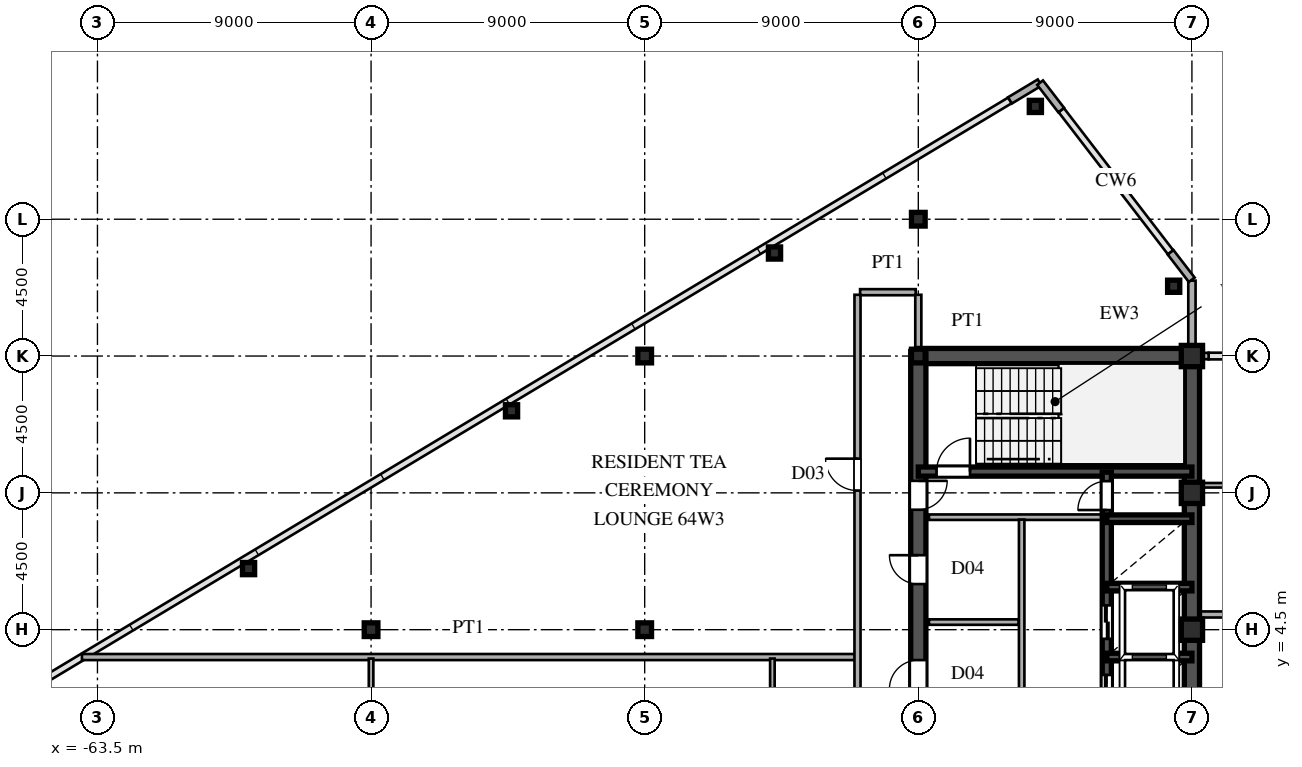
"""IFC4 building model, lengths in metres.
Left out: names, types, materials, properties, quantities, classifications, styles, units other than length and angle.
Written with IfcOpenShell. Run it as: python <this file> out.ifc"""

import sys

from ifc_helpers import new_model, si_unit, direction, frame, frame_2d, origin, origin_2d, place, context, subcontext, project, spatial, rectangle, hollow_rectangle, i_section, extrude, source, transform, mapped, element, fill, save


model = new_model("IFC4")
c1 = context("Model", 3, precision=1e-05, world=origin(), true_north=direction((0.0, 1.0)))
c2 = subcontext(c1, "Body", "Model", "MODEL_VIEW")
j1 = project(units=[si_unit("LENGTHUNIT", "METRE"), si_unit("PLANEANGLEUNIT", "RADIAN")], contexts=[c1])
p1 = place(None, origin())
s1 = spatial("IfcSite", under=j1, at=p1, CompositionType="ELEMENT")
p2 = place(p1, origin())
s2 = spatial("IfcBuilding", under=s1, at=p2, CompositionType="ELEMENT")
p3 = place(p2, frame((0.0, 0.0, 243.15)))
s3 = spatial("IfcBuildingStorey", under=s2, at=p3, CompositionType="ELEMENT", Elevation=243.15)
m1 = source(origin(), c2, "Body", "SweptSolid", [
    extrude(hollow_rectangle(XDim=0.7, YDim=0.7, WallThickness=0.03, at=origin_2d()), origin(), (0.0, 0.0, 1.0), 3.75),
])
for number, where, z_axis, x_axis in (
    (1, (-27.5, 4.5, 0.0), (0.0, 0.0, 1.0), (1.0, 0.0, 0.0)),
    (2, (-27.5, 9.0, 0.0), (0.0, 0.0, 1.0), (1.0, 0.0, 0.0)),
    (3, (-27.5, 13.5, 0.0), (0.0, 0.0, 1.0), (1.0, 0.0, 0.0)),
):
    element("IfcColumn", number, at=place(p3, frame(where, z_axis=z_axis, x_axis=x_axis)), inside=s3, PredefinedType="COLUMN", context=c2, shape_type="MappedRepresentation", body=[
        mapped(m1, transform((0.0, 0.0, 0.0), scale=1.0)),
    ])
m2 = source(origin(), c2, "Body", "SweptSolid", [
    extrude(i_section(OverallWidth=0.45, OverallDepth=0.45, WebThickness=0.016, FlangeThickness=0.025, at=origin_2d()), origin(), (0.0, 0.0, 1.0), 3.75),
])
for number, where, z_axis, x_axis in (
    (4, (-36.5, 13.5, 0.0), (0.0, 0.0, 1.0), (1.0, 0.0, 0.0)),
    (5, (-36.5, 18.0, 0.0), (0.0, 0.0, 1.0), (1.0, 0.0, 0.0)),
    (6, (-45.5, 4.5, 0.0), (0.0, 0.0, 1.0), (1.0, 0.0, 0.0)),
    (7, (-45.5, 13.5, 0.0), (0.0, 0.0, 1.0), (1.0, 0.0, 0.0)),
    (8, (-54.5, 4.5, 0.0), (0.0, 0.0, 1.0), (1.0, 0.0, 0.0)),
):
    element("IfcColumn", number, at=place(p3, frame(where, z_axis=z_axis, x_axis=x_axis)), inside=s3, PredefinedType="COLUMN", context=c2, shape_type="MappedRepresentation", body=[
        mapped(m2, transform((0.0, 0.0, 0.0), scale=1.0)),
    ])
m3 = source(origin(), c2, "Body", "SweptSolid", [
    extrude(hollow_rectangle(XDim=0.4, YDim=0.4, WallThickness=0.016, at=origin_2d()), origin(), (0.0, 0.0, 1.0), 3.75),
])
for number, where, z_axis, x_axis in (
    (9, (-28.1, 15.796, 0.0), (0.0, 0.0, 1.0), (1.0, 0.0, 0.0)),
    (10, (-32.65, 21.71, 0.0), (0.0, 0.0, 1.0), (1.0, 0.0, 0.0)),
    (11, (-41.23, 16.889, 0.0), (0.0, 0.0, 1.0), (1.0, 0.0, 0.0)),
    (12, (-49.88, 11.699, 0.0), (0.0, 0.0, 1.0), (1.0, 0.0, 0.0)),
    (13, (-58.53, 6.509, 0.0), (0.0, 0.0, 1.0), (1.0, 0.0, 0.0)),
):
    element("IfcColumn", number, at=place(p3, frame(where, z_axis=z_axis, x_axis=x_axis)), inside=s3, PredefinedType="COLUMN", context=c2, shape_type="MappedRepresentation", body=[
        mapped(m3, transform((0.0, 0.0, 0.0), scale=1.0)),
    ])
p4 = place(p3, frame((-27.5, 13.755, 0.0), z_axis=(0.0, 0.0, 1.0), x_axis=(0.0, 1.0, 0.0)))
e14 = element("IfcWall", 14, at=p4, inside=s3, PredefinedType="SOLIDWALL", context=c2, shape_type="SweptSolid", body=[
    extrude(rectangle(XDim=0.62, YDim=0.24, at=frame_2d((0.31, 0.0))), origin(), (0.0, 0.0, 1.0), 3.03),
])
p5 = place(p3, frame((-27.5, 14.375, 0.0), z_axis=(0.0, 0.0, 1.0), x_axis=(0.0, 1.0, 0.0)))
e15 = element("IfcWall", 15, at=p5, inside=s3, PredefinedType="SOLIDWALL", context=c2, shape_type="SweptSolid", body=[
    extrude(rectangle(XDim=1.605, YDim=0.24, at=frame_2d((0.803, 0.0))), origin(), (0.0, 0.0, 1.0), 3.53),
])
for number, where, z_axis, x_axis in (
    (16, (-27.506, 16.008, 0.0), (0.0, 0.0, 1.0), (-0.61, 0.793, 0.0)),
    (17, (-31.799, 21.588, 0.0), (0.0, 0.0, 1.0), (-0.61, 0.793, 0.0)),
    (18, (-32.509, 22.495, 0.0), (0.0, 0.0, 1.0), (-0.857, -0.515, 0.0)),
):
    element("IfcWall", number, at=place(p3, frame(where, z_axis=z_axis, x_axis=x_axis)), inside=s3, PredefinedType="SOLIDWALL", context=c2, shape_type="SweptSolid", body=[
        extrude(rectangle(XDim=1.14, YDim=0.24, at=frame_2d((0.57, 0.0))), origin(), (0.0, 0.0, 1.0), 3.53),
    ])
p6 = place(p3, frame((-27.49, 13.5, 0.0), z_axis=(0.0, 0.0, 1.0), x_axis=(1.0, 0.0, 0.0)))
e19 = element("IfcWall", 19, at=p6, inside=s3, PredefinedType="SOLIDWALL", context=c2, shape_type="SweptSolid", body=[
    extrude(rectangle(XDim=0.54, YDim=0.21, at=frame_2d((0.27, 0.0))), origin(), (0.0, 0.0, 1.0), 3.03),
])
p7 = place(p3, frame((-27.5, 1.3, 0.0), z_axis=(0.0, 0.0, 1.0), x_axis=(0.0, 1.0, 0.0)))
e20 = element("IfcWall", 20, at=p7, inside=s3, PredefinedType="SHEAR", context=c2, shape_type="SweptSolid", body=[
    extrude(rectangle(XDim=12.2, YDim=0.5, at=frame_2d((6.1, 0.0))), origin(), (0.0, 0.0, 1.0), 3.53),
])
p8 = place(p3, frame((-36.5, 13.5, 0.0), z_axis=(0.0, 0.0, 1.0), x_axis=(1.0, 0.0, 0.0)))
e21 = element("IfcWall", 21, at=p8, inside=s3, PredefinedType="SHEAR", context=c2, shape_type="SweptSolid", body=[
    extrude(rectangle(XDim=9.0, YDim=0.5, at=frame_2d((4.5, 0.0))), origin(), (0.0, 0.0, 1.0), 3.53),
])
p9 = place(p3, frame((-36.5, 8.2, 0.0), z_axis=(0.0, 0.0, 1.0), x_axis=(0.0, 1.0, 0.0)))
e22 = element("IfcWall", 22, at=p9, inside=s3, PredefinedType="SHEAR", context=c2, shape_type="SweptSolid", body=[
    extrude(rectangle(XDim=5.45, YDim=0.5, at=frame_2d((2.725, 0.0))), origin(), (0.0, 0.0, 1.0), 3.53),
])
p10 = place(p9, frame((0.245, 0.0, 0.0)))
e23 = element("IfcOpeningElement", 23, at=p10, cuts=e22, PredefinedType="OPENING", context=c2, shape_type="SweptSolid", body=[
    extrude(rectangle(XDim=0.95, YDim=2.15, at=frame_2d((0.475, 1.075))), frame((0.0, 0.26, 0.0), z_axis=(0.0, -1.0, 0.0), x_axis=(1.0, 0.0, 0.0)), (0.0, 0.0, 1.0), 0.52),
])
p11 = place(p3, frame((-36.5, 1.3, 0.0), z_axis=(0.0, 0.0, 1.0), x_axis=(0.0, 1.0, 0.0)))
e24 = element("IfcWall", 24, at=p11, inside=s3, PredefinedType="SHEAR", context=c2, shape_type="SweptSolid", body=[
    extrude(rectangle(XDim=3.45, YDim=0.5, at=frame_2d((1.725, 0.0))), origin(), (0.0, 0.0, 1.0), 3.53),
])
p12 = place(p11, frame((1.25, 0.0, 0.0)))
e25 = element("IfcOpeningElement", 25, at=p12, cuts=e24, PredefinedType="OPENING", context=c2, shape_type="SweptSolid", body=[
    extrude(rectangle(XDim=0.95, YDim=2.15, at=frame_2d((0.475, 1.075))), frame((0.0, 0.26, 0.0), z_axis=(0.0, -1.0, 0.0), x_axis=(1.0, 0.0, 0.0)), (0.0, 0.0, 1.0), 0.52),
])
p13 = place(p3, frame((-36.5, 4.75, 0.0), z_axis=(0.0, 0.0, 1.0), x_axis=(0.0, 1.0, 0.0)))
e26 = element("IfcWall", 26, at=p13, inside=s3, PredefinedType="SHEAR", context=c2, shape_type="SweptSolid", body=[
    extrude(rectangle(XDim=3.45, YDim=0.5, at=frame_2d((1.725, 0.0))), origin(), (0.0, 0.0, 1.0), 3.53),
])
p14 = place(p13, frame((1.25, 0.0, 0.0)))
e27 = element("IfcOpeningElement", 27, at=p14, cuts=e26, PredefinedType="OPENING", context=c2, shape_type="SweptSolid", body=[
    extrude(rectangle(XDim=0.95, YDim=2.15, at=frame_2d((0.475, 1.075))), frame((0.0, 0.26, 0.0), z_axis=(0.0, -1.0, 0.0), x_axis=(1.0, 0.0, 0.0)), (0.0, 0.0, 1.0), 0.52),
])
p15 = place(p3, frame((-36.5, 9.7, 0.0), z_axis=(0.0, 0.0, 1.0), x_axis=(1.0, 0.0, 0.0)))
e28 = element("IfcWall", 28, at=p15, inside=s3, PredefinedType="SHEAR", context=c2, shape_type="SweptSolid", body=[
    extrude(rectangle(XDim=9.0, YDim=0.3, at=frame_2d((4.5, 0.0))), origin(), (0.0, 0.0, 1.0), 3.53),
])
p16 = place(p15, frame((0.6, 0.0, 0.0)))
e29 = element("IfcOpeningElement", 29, at=p16, cuts=e28, PredefinedType="OPENING", context=c2, shape_type="SweptSolid", body=[
    extrude(rectangle(XDim=1.1, YDim=2.2, at=frame_2d((0.55, 1.1))), frame((0.0, 0.16, 0.0), z_axis=(0.0, -1.0, 0.0), x_axis=(1.0, 0.0, 0.0)), (0.0, 0.0, 1.0), 0.32),
])
for number, where, z_axis, x_axis in (
    (30, (-30.3, 3.6, 0.0), (0.0, 0.0, 1.0), (1.0, 0.0, 0.0)),
    (31, (-30.3, 5.9, 0.0), (0.0, 0.0, 1.0), (1.0, 0.0, 0.0)),
    (32, (-30.3, 8.15, 0.0), (0.0, 0.0, 1.0), (1.0, 0.0, 0.0)),
):
    element("IfcWall", number, at=place(p3, frame(where, z_axis=z_axis, x_axis=x_axis)), inside=s3, PredefinedType="SHEAR", context=c2, shape_type="SweptSolid", body=[
        extrude(rectangle(XDim=2.8, YDim=0.25, at=frame_2d((1.4, 0.0))), origin(), (0.0, 0.0, 1.0), 3.53),
    ])
p17 = place(p3, frame((-30.3, 1.32, 0.0), z_axis=(0.0, 0.0, 1.0), x_axis=(0.0, 1.0, 0.0)))
e33 = element("IfcWall", 33, at=p17, inside=s3, PredefinedType="SHEAR", context=c2, shape_type="SweptSolid", body=[
    extrude(rectangle(XDim=2.28, YDim=0.3, at=frame_2d((1.14, 0.0))), origin(), (0.0, 0.0, 1.0), 3.53),
])
p18 = place(p17, frame((0.59, 0.0, 0.0)))
e34 = element("IfcOpeningElement", 34, at=p18, cuts=e33, PredefinedType="OPENING", context=c2, shape_type="SweptSolid", body=[
    extrude(rectangle(XDim=1.1, YDim=2.2, at=frame_2d((0.55, 1.1))), frame((0.0, 0.16, 0.0), z_axis=(0.0, -1.0, 0.0), x_axis=(1.0, 0.0, 0.0)), (0.0, 0.0, 1.0), 0.32),
])
p19 = place(p3, frame((-30.3, 3.6, 0.0), z_axis=(0.0, 0.0, 1.0), x_axis=(0.0, 1.0, 0.0)))
e35 = element("IfcWall", 35, at=p19, inside=s3, PredefinedType="SHEAR", context=c2, shape_type="SweptSolid", body=[
    extrude(rectangle(XDim=2.3, YDim=0.3, at=frame_2d((1.15, 0.0))), origin(), (0.0, 0.0, 1.0), 3.53),
])
p20 = place(p19, frame((0.6, 0.0, 0.0)))
e36 = element("IfcOpeningElement", 36, at=p20, cuts=e35, PredefinedType="OPENING", context=c2, shape_type="SweptSolid", body=[
    extrude(rectangle(XDim=1.1, YDim=2.2, at=frame_2d((0.55, 1.1))), frame((0.0, 0.16, 0.0), z_axis=(0.0, -1.0, 0.0), x_axis=(1.0, 0.0, 0.0)), (0.0, 0.0, 1.0), 0.32),
])
p21 = place(p3, frame((-30.3, 5.9, 0.0), z_axis=(0.0, 0.0, 1.0), x_axis=(0.0, 1.0, 0.0)))
e37 = element("IfcWall", 37, at=p21, inside=s3, PredefinedType="SHEAR", context=c2, shape_type="SweptSolid", body=[
    extrude(rectangle(XDim=2.25, YDim=0.3, at=frame_2d((1.125, 0.0))), origin(), (0.0, 0.0, 1.0), 3.53),
])
p22 = place(p3, frame((-30.3, 8.15, 0.0), z_axis=(0.0, 0.0, 1.0), x_axis=(0.0, 1.0, 0.0)))
e38 = element("IfcWall", 38, at=p22, inside=s3, PredefinedType="SHEAR", context=c2, shape_type="SweptSolid", body=[
    extrude(rectangle(XDim=1.53, YDim=0.3, at=frame_2d((0.765, 0.0))), origin(), (0.0, 0.0, 1.0), 3.53),
])
p23 = place(p22, frame((0.285, 0.0, 0.0)))
e39 = element("IfcOpeningElement", 39, at=p23, cuts=e38, PredefinedType="OPENING", context=c2, shape_type="SweptSolid", body=[
    extrude(rectangle(XDim=0.95, YDim=2.15, at=frame_2d((0.475, 1.075))), frame((0.0, 0.16, 0.0), z_axis=(0.0, -1.0, 0.0), x_axis=(1.0, 0.0, 0.0)), (0.0, 0.0, 1.0), 0.32),
])
p24 = place(p3, frame((-36.15, 8.2, 0.0), z_axis=(0.0, 0.0, 1.0), x_axis=(1.0, 0.0, 0.0)))
e40 = element("IfcWall", 40, at=p24, inside=s3, PredefinedType="PARTITIONING", context=c2, shape_type="SweptSolid", body=[
    extrude(rectangle(XDim=5.7, YDim=0.18, at=frame_2d((2.85, 0.0))), origin(), (0.0, 0.0, 1.0), 3.53),
])
p25 = place(p3, frame((-33.1, 1.38, 0.0), z_axis=(0.0, 0.0, 1.0), x_axis=(0.0, 1.0, 0.0)))
e41 = element("IfcWall", 41, at=p25, inside=s3, PredefinedType="PARTITIONING", context=c2, shape_type="SweptSolid", body=[
    extrude(rectangle(XDim=6.74, YDim=0.18, at=frame_2d((3.37, 0.0))), origin(), (0.0, 0.0, 1.0), 3.53),
])
p26 = place(p3, frame((-36.15, 4.75, 0.0), z_axis=(0.0, 0.0, 1.0), x_axis=(1.0, 0.0, 0.0)))
e42 = element("IfcWall", 42, at=p26, inside=s3, PredefinedType="PARTITIONING", context=c2, shape_type="SweptSolid", body=[
    extrude(rectangle(XDim=2.95, YDim=0.18, at=frame_2d((1.475, 0.0))), origin(), (0.0, 0.0, 1.0), 3.53),
])
p27 = place(p3, frame((-64.01, 3.6, 0.0), z_axis=(0.0, 0.0, 1.0), x_axis=(1.0, 0.0, 0.0)))
e43 = element("IfcWall", 43, at=p27, inside=s3, PredefinedType="PARTITIONING", context=c2, shape_type="SweptSolid", body=[
    extrude(rectangle(XDim=25.43, YDim=0.2, at=frame_2d((12.715, 0.0))), origin(), (0.0, 0.0, 1.0), 3.53),
])
p28 = place(p3, frame((-27.245, 5.0, 0.0), z_axis=(0.0, 0.0, 1.0), x_axis=(1.0, 0.0, 0.0)))
e44 = element("IfcWall", 44, at=p28, inside=s3, PredefinedType="PARTITIONING", context=c2, shape_type="SweptSolid", body=[
    extrude(rectangle(XDim=54.49, YDim=0.2, at=frame_2d((27.245, 0.0))), origin(), (0.0, 0.0, 1.0), 3.53),
])
p29 = place(p28, frame((23.47, 0.0, 0.0)))
e45 = element("IfcOpeningElement", 45, at=p29, cuts=e44, PredefinedType="OPENING", context=c2, shape_type="SweptSolid", body=[
    extrude(rectangle(XDim=1.05, YDim=2.25, at=frame_2d((0.525, 1.125))), frame((0.0, 0.11, 0.0), z_axis=(0.0, -1.0, 0.0), x_axis=(1.0, 0.0, 0.0)), (0.0, 0.0, 1.0), 0.22),
])
p30 = place(p3, frame((-27.245, 9.25, 0.0), z_axis=(0.0, 0.0, 1.0), x_axis=(1.0, 0.0, 0.0)))
e46 = element("IfcWall", 46, at=p30, inside=s3, PredefinedType="PARTITIONING", context=c2, shape_type="SweptSolid", body=[
    extrude(rectangle(XDim=6.66, YDim=0.15, at=frame_2d((3.33, 0.0))), origin(), (0.0, 0.0, 1.0), 3.53),
])
p31 = place(p30, frame((3.07, 0.0, 0.0)))
e47 = element("IfcOpeningElement", 47, at=p31, cuts=e46, PredefinedType="OPENING", context=c2, shape_type="SweptSolid", body=[
    extrude(rectangle(XDim=0.95, YDim=2.15, at=frame_2d((0.475, 1.075))), frame((0.0, 0.085, 0.0), z_axis=(0.0, -1.0, 0.0), x_axis=(1.0, 0.0, 0.0)), (0.0, 0.0, 1.0), 0.17),
])
p32 = place(p3, frame((-38.415, 15.6, 0.0), z_axis=(0.0, 0.0, 1.0), x_axis=(1.0, 0.0, 0.0)))
e48 = element("IfcWall", 48, at=p32, inside=s3, PredefinedType="PARTITIONING", context=c2, shape_type="SweptSolid", body=[
    extrude(rectangle(XDim=1.83, YDim=0.2, at=frame_2d((0.915, 0.0))), origin(), (0.0, 0.0, 1.0), 3.53),
])
p33 = place(p3, frame((-54.5, -8.75, 0.0), z_axis=(0.0, 0.0, 1.0), x_axis=(0.0, 1.0, 0.0)))
e49 = element("IfcWall", 49, at=p33, inside=s3, PredefinedType="PARTITIONING", context=c2, shape_type="SweptSolid", body=[
    extrude(rectangle(XDim=12.3, YDim=0.15, at=frame_2d((6.15, 0.0))), origin(), (0.0, 0.0, 1.0), 2.93),
])
p34 = place(p33, frame((5.675, 0.0, 0.0)))
e50 = element("IfcOpeningElement", 50, at=p34, cuts=e49, PredefinedType="OPENING", context=c2, shape_type="SweptSolid", body=[
    extrude(rectangle(XDim=0.95, YDim=2.15, at=frame_2d((0.475, 1.075))), frame((0.0, 0.085, 0.0), z_axis=(0.0, -1.0, 0.0), x_axis=(1.0, 0.0, 0.0)), (0.0, 0.0, 1.0), 0.17),
])
p35 = place(p3, frame((-41.3, -0.068, 0.0), z_axis=(0.0, 0.0, 1.0), x_axis=(0.0, 1.0, 0.0)))
e51 = element("IfcWall", 51, at=p35, inside=s3, PredefinedType="PARTITIONING", context=c2, shape_type="SweptSolid", body=[
    extrude(rectangle(XDim=3.618, YDim=0.15, at=frame_2d((1.809, 0.0))), origin(), (0.0, 0.0, 1.0), 3.53),
])
p36 = place(p3, frame((-38.5, -15.515, 0.0), z_axis=(0.0, 0.0, 1.0), x_axis=(0.0, 1.0, 0.0)))
e52 = element("IfcWall", 52, at=p36, inside=s3, PredefinedType="PARTITIONING", context=c2, shape_type="SweptSolid", body=[
    extrude(rectangle(XDim=31.03, YDim=0.2, at=frame_2d((15.515, 0.0))), origin(), (0.0, 0.0, 1.0), 3.53),
])
p37 = place(p36, frame((2.79, 0.0, 0.0)))
e53 = element("IfcOpeningElement", 53, at=p37, cuts=e52, PredefinedType="OPENING", context=c2, shape_type="SweptSolid", body=[
    extrude(rectangle(XDim=1.05, YDim=2.25, at=frame_2d((0.525, 1.125))), frame((0.0, 0.11, 0.0), z_axis=(0.0, -1.0, 0.0), x_axis=(1.0, 0.0, 0.0)), (0.0, 0.0, 1.0), 0.22),
])
p38 = place(p36, frame((12.204, 0.0, 0.0)))
e54 = element("IfcOpeningElement", 54, at=p38, cuts=e52, PredefinedType="OPENING", context=c2, shape_type="SweptSolid", body=[
    extrude(rectangle(XDim=1.05, YDim=2.25, at=frame_2d((0.525, 1.125))), frame((0.0, 0.11, 0.0), z_axis=(0.0, -1.0, 0.0), x_axis=(1.0, 0.0, 0.0)), (0.0, 0.0, 1.0), 0.22),
])
p39 = place(p36, frame((24.59, 0.0, 0.0)))
e55 = element("IfcOpeningElement", 55, at=p39, cuts=e52, PredefinedType="OPENING", context=c2, shape_type="SweptSolid", body=[
    extrude(rectangle(XDim=1.05, YDim=2.25, at=frame_2d((0.525, 1.125))), frame((0.0, 0.11, 0.0), z_axis=(0.0, -1.0, 0.0), x_axis=(1.0, 0.0, 0.0)), (0.0, 0.0, 1.0), 0.22),
])
p40 = place(p3, frame((-36.5, 13.755, 0.0), z_axis=(0.0, 0.0, 1.0), x_axis=(0.0, 1.0, 0.0)))
e56 = element("IfcWall", 56, at=p40, inside=s3, PredefinedType="PARTITIONING", context=c2, shape_type="SweptSolid", body=[
    extrude(rectangle(XDim=1.76, YDim=0.2, at=frame_2d((0.88, 0.0))), origin(), (0.0, 0.0, 1.0), 2.93),
])
m4 = source(origin(), c2, "Body", "SweptSolid", [
    extrude(rectangle(XDim=0.95, YDim=2.15, at=frame_2d((0.475, 1.075))), frame((0.0, 0.025, 0.0), z_axis=(0.0, -1.0, 0.0), x_axis=(1.0, 0.0, 0.0)), (0.0, 0.0, 1.0), 0.05),
])
p41 = place(p10, frame((0.95, 0.0, 0.0), z_axis=(0.0, 0.0, 1.0), x_axis=(-1.0, 0.0, 0.0)))
e57 = element("IfcDoor", 57, at=p41, inside=s3, OperationType="SINGLE_SWING_RIGHT", PredefinedType="DOOR", context=c2, shape_type="MappedRepresentation", body=[
    mapped(m4, transform((0.0, 0.0, 0.0), scale=1.0)),
])
fill(e23, e57)
p42 = place(p12, origin())
e58 = element("IfcDoor", 58, at=p42, inside=s3, OperationType="SINGLE_SWING_LEFT", PredefinedType="DOOR", context=c2, shape_type="MappedRepresentation", body=[
    mapped(m4, transform((0.0, 0.0, 0.0), scale=1.0)),
])
fill(e25, e58)
p43 = place(p14, origin())
e59 = element("IfcDoor", 59, at=p43, inside=s3, OperationType="SINGLE_SWING_RIGHT", PredefinedType="DOOR", context=c2, shape_type="MappedRepresentation", body=[
    mapped(m4, transform((0.0, 0.0, 0.0), scale=1.0)),
])
fill(e27, e59)
m5 = source(origin(), c2, "Body", "SweptSolid", [
    extrude(rectangle(XDim=1.1, YDim=2.2, at=frame_2d((0.55, 1.1))), frame((0.0, 0.025, 0.0), z_axis=(0.0, -1.0, 0.0), x_axis=(1.0, 0.0, 0.0)), (0.0, 0.0, 1.0), 0.05),
])
p44 = place(p16, origin())
e60 = element("IfcDoor", 60, at=p44, inside=s3, OperationType="SINGLE_SWING_RIGHT", PredefinedType="DOOR", context=c2, shape_type="MappedRepresentation", body=[
    mapped(m5, transform((0.0, 0.0, 0.0), scale=1.0)),
])
fill(e29, e60)
m6 = source(origin(), c2, "Body", "SweptSolid", [
    extrude(rectangle(XDim=1.1, YDim=2.2, at=frame_2d((0.55, 1.1))), frame((0.0, 0.025, 0.0), z_axis=(0.0, -1.0, 0.0), x_axis=(1.0, 0.0, 0.0)), (0.0, 0.0, 1.0), 0.05),
])
p45 = place(p18, origin())
e61 = element("IfcDoor", 61, at=p45, inside=s3, OperationType="DOUBLE_DOOR_SLIDING", PredefinedType="DOOR", context=c2, shape_type="MappedRepresentation", body=[
    mapped(m6, transform((0.0, 0.0, 0.0), scale=1.0)),
])
fill(e34, e61)
p46 = place(p20, origin())
e62 = element("IfcDoor", 62, at=p46, inside=s3, OperationType="DOUBLE_DOOR_SLIDING", PredefinedType="DOOR", context=c2, shape_type="MappedRepresentation", body=[
    mapped(m6, transform((0.0, 0.0, 0.0), scale=1.0)),
])
fill(e36, e62)
p47 = place(p23, origin())
e63 = element("IfcDoor", 63, at=p47, inside=s3, OperationType="SINGLE_SWING_LEFT", PredefinedType="DOOR", context=c2, shape_type="MappedRepresentation", body=[
    mapped(m4, transform((0.0, 0.0, 0.0), scale=1.0)),
])
fill(e39, e63)
m7 = source(origin(), c2, "Body", "SweptSolid", [
    extrude(rectangle(XDim=1.05, YDim=2.25, at=frame_2d((0.525, 1.125))), frame((0.0, 0.025, 0.0), z_axis=(0.0, -1.0, 0.0), x_axis=(1.0, 0.0, 0.0)), (0.0, 0.0, 1.0), 0.05),
])
p48 = place(p39, origin())
e64 = element("IfcDoor", 64, at=p48, inside=s3, OperationType="SINGLE_SWING_RIGHT", PredefinedType="DOOR", context=c2, shape_type="MappedRepresentation", body=[
    mapped(m7, transform((0.0, 0.0, 0.0), scale=1.0)),
])
fill(e55, e64)
save(model, sys.argv[1])
